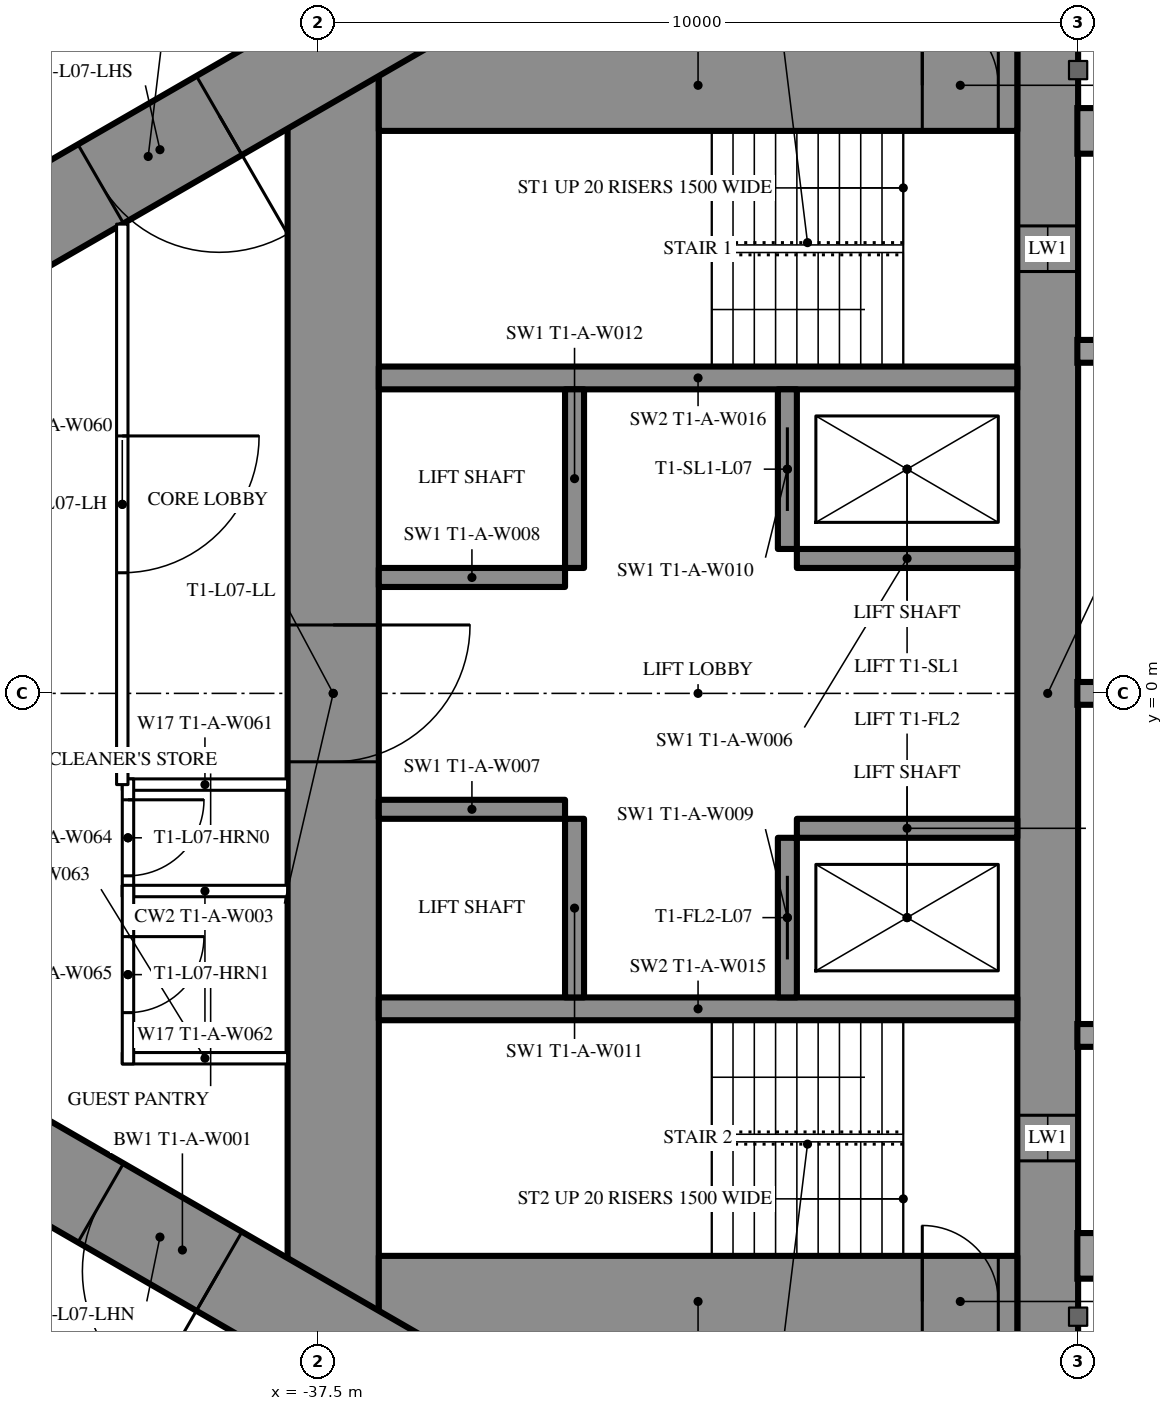
"""IFC4 building model, lengths in metres.
Left out: names, types, materials, properties, quantities, classifications, styles, units other than length and angle.
Written with IfcOpenShell. Run it as: python <this file> out.ifc"""

import sys

from ifc_helpers import new_model, si_unit, direction, frame, frame_2d, origin, place, context, subcontext, project, spatial, rectangle, extrude, element, fill, save


model = new_model("IFC4")
c1 = context("Model", 3, precision=1e-05, world=origin(), true_north=direction((0.0, 1.0)))
c2 = subcontext(c1, "Body", "Model", "MODEL_VIEW")
j1 = project(units=[si_unit("LENGTHUNIT", "METRE"), si_unit("PLANEANGLEUNIT", "RADIAN")], contexts=[c1])
p1 = place(None, origin())
s1 = spatial("IfcSite", under=j1, at=p1, CompositionType="ELEMENT")
p2 = place(p1, origin())
s2 = spatial("IfcBuilding", under=s1, at=p2, CompositionType="ELEMENT")
p3 = place(p2, frame((0.0, 0.0, 32.0)))
s3 = spatial("IfcBuildingStorey", under=s2, at=p3, CompositionType="ELEMENT", Elevation=32.0)
p4 = place(p3, frame((-27.9, 8.6, 0.0), z_axis=(0.0, 0.0, 1.0), x_axis=(0.0, -1.0, 0.0)))
e1 = element("IfcWall", 1, at=p4, inside=s3, PredefinedType="SHEAR", context=c2, shape_type="SweptSolid", body=[
    extrude(rectangle(XDim=17.2, YDim=0.8, at=frame_2d((8.6, 0.0))), origin(), (0.0, 0.0, 1.0), 3.5),
])
p5 = place(p4, frame((2.45, 0.0, 0.6)))
e2 = element("IfcOpeningElement", 2, at=p5, cuts=e1, PredefinedType="OPENING", context=c2, shape_type="SweptSolid", body=[
    extrude(rectangle(XDim=0.6, YDim=2.1, at=frame_2d((0.3, 1.05))), frame((0.0, 0.41, 0.0), z_axis=(0.0, -1.0, 0.0), x_axis=(1.0, 0.0, 0.0)), (0.0, 0.0, 1.0), 0.82),
])
p6 = place(p4, frame((14.15, 0.0, 0.6)))
e3 = element("IfcOpeningElement", 3, at=p6, cuts=e1, PredefinedType="OPENING", context=c2, shape_type="SweptSolid", body=[
    extrude(rectangle(XDim=0.6, YDim=2.1, at=frame_2d((0.3, 1.05))), frame((0.0, 0.41, 0.0), z_axis=(0.0, -1.0, 0.0), x_axis=(1.0, 0.0, 0.0)), (0.0, 0.0, 1.0), 0.82),
])
p7 = place(p3, frame((-37.3, 8.6, 0.0), z_axis=(0.0, 0.0, 1.0), x_axis=(0.0, -1.0, 0.0)))
e4 = element("IfcWall", 4, at=p7, inside=s3, PredefinedType="SHEAR", context=c2, shape_type="SweptSolid", body=[
    extrude(rectangle(XDim=17.2, YDim=1.2, at=frame_2d((8.6, 0.0))), origin(), (0.0, 0.0, 1.0), 3.5),
])
p8 = place(p7, frame((7.7, 0.0, 0.0)))
e5 = element("IfcOpeningElement", 5, at=p8, cuts=e4, PredefinedType="OPENING", context=c2, shape_type="SweptSolid", body=[
    extrude(rectangle(XDim=1.8, YDim=2.2, at=frame_2d((0.9, 1.1))), frame((0.0, 0.61, 0.0), z_axis=(0.0, -1.0, 0.0), x_axis=(1.0, 0.0, 0.0)), (0.0, 0.0, 1.0), 1.22),
])
p9 = place(p3, frame((-28.3, 8.0, 0.0), z_axis=(0.0, 0.0, 1.0), x_axis=(-1.0, 0.0, 0.0)))
e6 = element("IfcWall", 6, at=p9, inside=s3, PredefinedType="SHEAR", context=c2, shape_type="SweptSolid", body=[
    extrude(rectangle(XDim=8.4, YDim=1.2, at=frame_2d((4.2, 0.0))), origin(), (0.0, 0.0, 1.0), 3.5),
])
p10 = place(p9, frame((0.25, 0.0, 0.0)))
e7 = element("IfcOpeningElement", 7, at=p10, cuts=e6, PredefinedType="OPENING", context=c2, shape_type="SweptSolid", body=[
    extrude(rectangle(XDim=1.0, YDim=2.2, at=frame_2d((0.5, 1.1))), frame((0.0, 0.61, 0.0), z_axis=(0.0, -1.0, 0.0), x_axis=(1.0, 0.0, 0.0)), (0.0, 0.0, 1.0), 1.22),
])
p11 = place(p3, frame((-28.3, -8.0, 0.0), z_axis=(0.0, 0.0, 1.0), x_axis=(-1.0, 0.0, 0.0)))
e8 = element("IfcWall", 8, at=p11, inside=s3, PredefinedType="SHEAR", context=c2, shape_type="SweptSolid", body=[
    extrude(rectangle(XDim=8.4, YDim=1.2, at=frame_2d((4.2, 0.0))), origin(), (0.0, 0.0, 1.0), 3.5),
])
p12 = place(p11, frame((0.25, 0.0, 0.0)))
e9 = element("IfcOpeningElement", 9, at=p12, cuts=e8, PredefinedType="OPENING", context=c2, shape_type="SweptSolid", body=[
    extrude(rectangle(XDim=1.0, YDim=2.2, at=frame_2d((0.5, 1.1))), frame((0.0, 0.61, 0.0), z_axis=(0.0, -1.0, 0.0), x_axis=(1.0, 0.0, 0.0)), (0.0, 0.0, 1.0), 1.22),
])
for number, where, z_axis, x_axis in (
    (10, (-28.3, 4.15, 0.0), (0.0, 0.0, 1.0), (-1.0, 0.0, 0.0)),
    (11, (-28.3, -4.15, 0.0), (0.0, 0.0, 1.0), (-1.0, 0.0, 0.0)),
):
    element("IfcWall", number, at=place(p3, frame(where, z_axis=z_axis, x_axis=x_axis)), inside=s3, PredefinedType="SHEAR", context=c2, shape_type="SweptSolid", body=[
        extrude(rectangle(XDim=8.4, YDim=0.3, at=frame_2d((4.2, 0.0))), origin(), (0.0, 0.0, 1.0), 3.5),
    ])
p13 = place(p3, frame((-31.325, 4.0, 0.0), z_axis=(0.0, 0.0, 1.0), x_axis=(0.0, -1.0, 0.0)))
e12 = element("IfcWall", 12, at=p13, inside=s3, PredefinedType="SHEAR", context=c2, shape_type="SweptSolid", body=[
    extrude(rectangle(XDim=2.1, YDim=0.25, at=frame_2d((1.05, 0.0))), origin(), (0.0, 0.0, 1.0), 3.5),
])
p14 = place(p13, frame((0.5, 0.0, 0.0)))
e13 = element("IfcOpeningElement", 13, at=p14, cuts=e12, PredefinedType="OPENING", context=c2, shape_type="SweptSolid", body=[
    extrude(rectangle(XDim=1.1, YDim=2.2, at=frame_2d((0.55, 1.1))), frame((0.0, 0.135, 0.0), z_axis=(0.0, -1.0, 0.0), x_axis=(1.0, 0.0, 0.0)), (0.0, 0.0, 1.0), 0.27),
])
p15 = place(p3, frame((-34.125, 4.0, 0.0), z_axis=(0.0, 0.0, 1.0), x_axis=(0.0, -1.0, 0.0)))
e14 = element("IfcWall", 14, at=p15, inside=s3, PredefinedType="SHEAR", context=c2, shape_type="SweptSolid", body=[
    extrude(rectangle(XDim=2.35, YDim=0.25, at=frame_2d((1.175, 0.0))), origin(), (0.0, 0.0, 1.0), 3.5),
])
p16 = place(p3, frame((-28.3, 1.775, 0.0), z_axis=(0.0, 0.0, 1.0), x_axis=(-1.0, 0.0, 0.0)))
e15 = element("IfcWall", 15, at=p16, inside=s3, PredefinedType="SHEAR", context=c2, shape_type="SweptSolid", body=[
    extrude(rectangle(XDim=2.9, YDim=0.25, at=frame_2d((1.45, 0.0))), origin(), (0.0, 0.0, 1.0), 3.5),
])
p17 = place(p3, frame((-34.25, 1.525, 0.0), z_axis=(0.0, 0.0, 1.0), x_axis=(-1.0, 0.0, 0.0)))
e16 = element("IfcWall", 16, at=p17, inside=s3, PredefinedType="SHEAR", context=c2, shape_type="SweptSolid", body=[
    extrude(rectangle(XDim=2.45, YDim=0.25, at=frame_2d((1.225, 0.0))), origin(), (0.0, 0.0, 1.0), 3.5),
])
p18 = place(p3, frame((-31.325, -1.9, 0.0), z_axis=(0.0, 0.0, 1.0), x_axis=(0.0, -1.0, 0.0)))
e17 = element("IfcWall", 17, at=p18, inside=s3, PredefinedType="SHEAR", context=c2, shape_type="SweptSolid", body=[
    extrude(rectangle(XDim=2.1, YDim=0.25, at=frame_2d((1.05, 0.0))), origin(), (0.0, 0.0, 1.0), 3.5),
])
p19 = place(p18, frame((0.5, 0.0, 0.0)))
e18 = element("IfcOpeningElement", 18, at=p19, cuts=e17, PredefinedType="OPENING", context=c2, shape_type="SweptSolid", body=[
    extrude(rectangle(XDim=1.1, YDim=2.2, at=frame_2d((0.55, 1.1))), frame((0.0, 0.135, 0.0), z_axis=(0.0, -1.0, 0.0), x_axis=(1.0, 0.0, 0.0)), (0.0, 0.0, 1.0), 0.27),
])
p20 = place(p3, frame((-34.125, -1.65, 0.0), z_axis=(0.0, 0.0, 1.0), x_axis=(0.0, -1.0, 0.0)))
e19 = element("IfcWall", 19, at=p20, inside=s3, PredefinedType="SHEAR", context=c2, shape_type="SweptSolid", body=[
    extrude(rectangle(XDim=2.35, YDim=0.25, at=frame_2d((1.175, 0.0))), origin(), (0.0, 0.0, 1.0), 3.5),
])
p21 = place(p3, frame((-28.3, -1.775, 0.0), z_axis=(0.0, 0.0, 1.0), x_axis=(-1.0, 0.0, 0.0)))
e20 = element("IfcWall", 20, at=p21, inside=s3, PredefinedType="SHEAR", context=c2, shape_type="SweptSolid", body=[
    extrude(rectangle(XDim=2.9, YDim=0.25, at=frame_2d((1.45, 0.0))), origin(), (0.0, 0.0, 1.0), 3.5),
])
p22 = place(p3, frame((-34.25, -1.525, 0.0), z_axis=(0.0, 0.0, 1.0), x_axis=(-1.0, 0.0, 0.0)))
e21 = element("IfcWall", 21, at=p22, inside=s3, PredefinedType="SHEAR", context=c2, shape_type="SweptSolid", body=[
    extrude(rectangle(XDim=2.45, YDim=0.25, at=frame_2d((1.225, 0.0))), origin(), (0.0, 0.0, 1.0), 3.5),
])
p23 = place(p3, frame((-27.2, 14.3, 0.0), z_axis=(0.0, 0.0, 1.0), x_axis=(-0.866026593062, -0.499997940104, 0.0)))
e22 = element("IfcWall", 22, at=p23, inside=s3, PredefinedType="SHEAR", context=c2, shape_type="SweptSolid", body=[
    extrude(rectangle(XDim=28.946, YDim=1.2, at=frame_2d((14.473, 0.0))), origin(), (0.0, 0.0, 1.0), 3.5),
])
p24 = place(p23, frame((4.6, 0.0, 0.0)))
e23 = element("IfcOpeningElement", 23, at=p24, cuts=e22, PredefinedType="OPENING", context=c2, shape_type="SweptSolid", body=[
    extrude(rectangle(XDim=1.0, YDim=2.2, at=frame_2d((0.5, 1.1))), frame((0.0, 0.61, 0.0), z_axis=(0.0, -1.0, 0.0), x_axis=(1.0, 0.0, 0.0)), (0.0, 0.0, 1.0), 1.22),
])
p25 = place(p23, frame((13.395, 0.0, 0.0)))
e24 = element("IfcOpeningElement", 24, at=p25, cuts=e22, PredefinedType="OPENING", context=c2, shape_type="SweptSolid", body=[
    extrude(rectangle(XDim=1.8, YDim=2.2, at=frame_2d((0.9, 1.1))), frame((0.0, 0.61, 0.0), z_axis=(0.0, -1.0, 0.0), x_axis=(1.0, 0.0, 0.0)), (0.0, 0.0, 1.0), 1.22),
])
p26 = place(p3, frame((-27.2, -14.3, 0.0), z_axis=(0.0, 0.0, 1.0), x_axis=(-0.866024021859, 0.500002393557, 0.0)))
e25 = element("IfcWall", 25, at=p26, inside=s3, PredefinedType="SHEAR", context=c2, shape_type="SweptSolid", body=[
    extrude(rectangle(XDim=27.907, YDim=1.2, at=frame_2d((13.954, 0.0))), origin(), (0.0, 0.0, 1.0), 3.5),
])
p27 = place(p26, frame((4.6, 0.0, 0.0)))
e26 = element("IfcOpeningElement", 26, at=p27, cuts=e25, PredefinedType="OPENING", context=c2, shape_type="SweptSolid", body=[
    extrude(rectangle(XDim=1.0, YDim=2.2, at=frame_2d((0.5, 1.1))), frame((0.0, 0.61, 0.0), z_axis=(0.0, -1.0, 0.0), x_axis=(1.0, 0.0, 0.0)), (0.0, 0.0, 1.0), 1.22),
])
p28 = place(p26, frame((13.395, 0.0, 0.0)))
e27 = element("IfcOpeningElement", 27, at=p28, cuts=e25, PredefinedType="OPENING", context=c2, shape_type="SweptSolid", body=[
    extrude(rectangle(XDim=1.8, YDim=2.2, at=frame_2d((0.9, 1.1))), frame((0.0, 0.61, 0.0), z_axis=(0.0, -1.0, 0.0), x_axis=(1.0, 0.0, 0.0)), (0.0, 0.0, 1.0), 1.22),
])
p29 = place(p3, frame((-37.7, 10.894, 0.0), z_axis=(0.0, 0.0, 1.0), x_axis=(-0.866027905338, -0.499995667157, 0.0)))
e28 = element("IfcWall", 28, at=p29, inside=s3, PredefinedType="PARTITIONING", context=c2, shape_type="SweptSolid", body=[
    extrude(rectangle(XDim=21.787, YDim=0.2, at=frame_2d((10.894, 0.0))), origin(), (0.0, 0.0, 1.0), 3.25),
])
p30 = place(p29, frame((16.008, 0.0, 0.0)))
e29 = element("IfcOpeningElement", 29, at=p30, cuts=e28, PredefinedType="OPENING", context=c2, shape_type="SweptSolid", body=[
    extrude(rectangle(XDim=0.95, YDim=2.2, at=frame_2d((0.475, 1.1))), frame((0.0, 0.11, 0.0), z_axis=(0.0, -1.0, 0.0), x_axis=(1.0, 0.0, 0.0)), (0.0, 0.0, 1.0), 0.22),
])
p31 = place(p29, frame((20.058, 0.0, 0.0)))
e30 = element("IfcOpeningElement", 30, at=p31, cuts=e28, PredefinedType="OPENING", context=c2, shape_type="SweptSolid", body=[
    extrude(rectangle(XDim=0.95, YDim=2.2, at=frame_2d((0.475, 1.1))), frame((0.0, 0.11, 0.0), z_axis=(0.0, -1.0, 0.0), x_axis=(1.0, 0.0, 0.0)), (0.0, 0.0, 1.0), 0.22),
])
p32 = place(p29, frame((2.95, 0.0, 0.0)))
e31 = element("IfcOpeningElement", 31, at=p32, cuts=e28, PredefinedType="OPENING", context=c2, shape_type="SweptSolid", body=[
    extrude(rectangle(XDim=0.95, YDim=2.2, at=frame_2d((0.475, 1.1))), frame((0.0, 0.11, 0.0), z_axis=(0.0, -1.0, 0.0), x_axis=(1.0, 0.0, 0.0)), (0.0, 0.0, 1.0), 0.22),
])
p33 = place(p3, frame((-36.92, -11.344, 0.0), z_axis=(0.0, 0.0, 1.0), x_axis=(-0.866028313256, 0.499994960614, 0.0)))
e32 = element("IfcWall", 32, at=p33, inside=s3, PredefinedType="PARTITIONING", context=c2, shape_type="SweptSolid", body=[
    extrude(rectangle(XDim=22.568, YDim=0.2, at=frame_2d((11.284, 0.0))), origin(), (0.0, 0.0, 1.0), 3.25),
])
p34 = place(p33, frame((12.68, 0.0, 0.0)))
e33 = element("IfcOpeningElement", 33, at=p34, cuts=e32, PredefinedType="OPENING", context=c2, shape_type="SweptSolid", body=[
    extrude(rectangle(XDim=0.95, YDim=2.2, at=frame_2d((0.475, 1.1))), frame((0.0, 0.11, 0.0), z_axis=(0.0, -1.0, 0.0), x_axis=(1.0, 0.0, 0.0)), (0.0, 0.0, 1.0), 0.22),
])
p35 = place(p33, frame((3.35, 0.0, 0.0)))
e34 = element("IfcOpeningElement", 34, at=p35, cuts=e32, PredefinedType="OPENING", context=c2, shape_type="SweptSolid", body=[
    extrude(rectangle(XDim=1.0, YDim=2.2, at=frame_2d((0.5, 1.1))), frame((0.0, 0.11, 0.0), z_axis=(0.0, -1.0, 0.0), x_axis=(1.0, 0.0, 0.0)), (0.0, 0.0, 1.0), 0.22),
])
for number, where, z_axis, x_axis in (
    (35, (-37.9, -1.2, 0.0), (0.0, 0.0, 1.0), (-1.0, 0.0, 0.0)),
    (36, (-37.9, -2.6, 0.0), (0.0, 0.0, 1.0), (-1.0, 0.0, 0.0)),
    (37, (-37.9, -4.8, 0.0), (0.0, 0.0, 1.0), (-1.0, 0.0, 0.0)),
):
    element("IfcWall", number, at=place(p3, frame(where, z_axis=z_axis, x_axis=x_axis)), inside=s3, PredefinedType="PARTITIONING", context=c2, shape_type="SweptSolid", body=[
        extrude(rectangle(XDim=2.175, YDim=0.15, at=frame_2d((1.087, 0.0))), origin(), (0.0, 0.0, 1.0), 3.25),
    ])
p36 = place(p3, frame((-40.0, -1.125, 0.0), z_axis=(0.0, 0.0, 1.0), x_axis=(0.0, -1.0, 0.0)))
e38 = element("IfcWall", 38, at=p36, inside=s3, PredefinedType="PARTITIONING", context=c2, shape_type="SweptSolid", body=[
    extrude(rectangle(XDim=1.55, YDim=0.15, at=frame_2d((0.775, 0.0))), origin(), (0.0, 0.0, 1.0), 3.25),
])
p37 = place(p36, frame((0.275, 0.0, 0.0)))
e39 = element("IfcOpeningElement", 39, at=p37, cuts=e38, PredefinedType="OPENING", context=c2, shape_type="SweptSolid", body=[
    extrude(rectangle(XDim=1.0, YDim=2.2, at=frame_2d((0.5, 1.1))), frame((0.0, 0.085, 0.0), z_axis=(0.0, -1.0, 0.0), x_axis=(1.0, 0.0, 0.0)), (0.0, 0.0, 1.0), 0.17),
])
p38 = place(p3, frame((-40.0, -2.525, 0.0), z_axis=(0.0, 0.0, 1.0), x_axis=(0.0, -1.0, 0.0)))
e40 = element("IfcWall", 40, at=p38, inside=s3, PredefinedType="PARTITIONING", context=c2, shape_type="SweptSolid", body=[
    extrude(rectangle(XDim=2.35, YDim=0.15, at=frame_2d((1.175, 0.0))), origin(), (0.0, 0.0, 1.0), 3.25),
])
p39 = place(p38, frame((0.675, 0.0, 0.0)))
e41 = element("IfcOpeningElement", 41, at=p39, cuts=e40, PredefinedType="OPENING", context=c2, shape_type="SweptSolid", body=[
    extrude(rectangle(XDim=1.0, YDim=2.2, at=frame_2d((0.5, 1.1))), frame((0.0, 0.085, 0.0), z_axis=(0.0, -1.0, 0.0), x_axis=(1.0, 0.0, 0.0)), (0.0, 0.0, 1.0), 0.17),
])
p40 = place(p3, frame((-40.075, 6.174, 0.0), z_axis=(0.0, 0.0, 1.0), x_axis=(0.0, -1.0, 0.0)))
e42 = element("IfcWall", 42, at=p40, inside=s3, PredefinedType="PARTITIONING", context=c2, shape_type="SweptSolid", body=[
    extrude(rectangle(XDim=7.374, YDim=0.15, at=frame_2d((3.687, 0.0))), origin(), (0.0, 0.0, 1.0), 3.25),
])
p41 = place(p40, frame((2.787, 0.0, 0.0)))
e43 = element("IfcOpeningElement", 43, at=p41, cuts=e42, PredefinedType="OPENING", context=c2, shape_type="SweptSolid", body=[
    extrude(rectangle(XDim=1.8, YDim=2.2, at=frame_2d((0.9, 1.1))), frame((0.0, 0.085, 0.0), z_axis=(0.0, -1.0, 0.0), x_axis=(1.0, 0.0, 0.0)), (0.0, 0.0, 1.0), 0.17),
])
p42 = place(p37, origin())
e44 = element("IfcDoor", 44, at=p42, inside=s3, OperationType="SINGLE_SWING_LEFT", PredefinedType="DOOR", context=c2, shape_type="SweptSolid", body=[
    extrude(rectangle(XDim=1.0, YDim=2.2, at=frame_2d((0.5, 1.1))), frame((0.0, 0.025, 0.0), z_axis=(0.0, -1.0, 0.0), x_axis=(1.0, 0.0, 0.0)), (0.0, 0.0, 1.0), 0.05),
])
fill(e39, e44)
p43 = place(p39, origin())
e45 = element("IfcDoor", 45, at=p43, inside=s3, OperationType="SINGLE_SWING_LEFT", PredefinedType="DOOR", context=c2, shape_type="SweptSolid", body=[
    extrude(rectangle(XDim=1.0, YDim=2.2, at=frame_2d((0.5, 1.1))), frame((0.0, 0.025, 0.0), z_axis=(0.0, -1.0, 0.0), x_axis=(1.0, 0.0, 0.0)), (0.0, 0.0, 1.0), 0.05),
])
fill(e41, e45)
p44 = place(p41, origin())
e46 = element("IfcDoor", 46, at=p44, inside=s3, OperationType="DOUBLE_DOOR_SINGLE_SWING", PredefinedType="DOOR", context=c2, shape_type="SweptSolid", body=[
    extrude(rectangle(XDim=1.8, YDim=2.2, at=frame_2d((0.9, 1.1))), frame((0.0, 0.025, 0.0), z_axis=(0.0, -1.0, 0.0), x_axis=(1.0, 0.0, 0.0)), (0.0, 0.0, 1.0), 0.05),
])
fill(e43, e46)
p45 = place(p25, origin())
e47 = element("IfcDoor", 47, at=p45, inside=s3, OperationType="DOUBLE_DOOR_SINGLE_SWING", PredefinedType="DOOR", context=c2, shape_type="SweptSolid", body=[
    extrude(rectangle(XDim=1.8, YDim=2.2, at=frame_2d((0.9, 1.1))), frame((0.0, 0.025, 0.0), z_axis=(0.0, -1.0, 0.0), x_axis=(1.0, 0.0, 0.0)), (0.0, 0.0, 1.0), 0.05),
])
fill(e24, e47)
p46 = place(p28, origin())
e48 = element("IfcDoor", 48, at=p46, inside=s3, OperationType="DOUBLE_DOOR_SINGLE_SWING", PredefinedType="DOOR", context=c2, shape_type="SweptSolid", body=[
    extrude(rectangle(XDim=1.8, YDim=2.2, at=frame_2d((0.9, 1.1))), frame((0.0, 0.025, 0.0), z_axis=(0.0, -1.0, 0.0), x_axis=(1.0, 0.0, 0.0)), (0.0, 0.0, 1.0), 0.05),
])
fill(e27, e48)
p47 = place(p8, origin())
e49 = element("IfcDoor", 49, at=p47, inside=s3, OperationType="DOUBLE_DOOR_SINGLE_SWING", PredefinedType="DOOR", context=c2, shape_type="SweptSolid", body=[
    extrude(rectangle(XDim=1.8, YDim=2.2, at=frame_2d((0.9, 1.1))), frame((0.0, 0.025, 0.0), z_axis=(0.0, -1.0, 0.0), x_axis=(1.0, 0.0, 0.0)), (0.0, 0.0, 1.0), 0.05),
])
fill(e5, e49)
p48 = place(p10, origin())
e50 = element("IfcDoor", 50, at=p48, inside=s3, OperationType="SINGLE_SWING_RIGHT", PredefinedType="DOOR", context=c2, shape_type="SweptSolid", body=[
    extrude(rectangle(XDim=1.0, YDim=2.2, at=frame_2d((0.5, 1.1))), frame((0.0, 0.025, 0.0), z_axis=(0.0, -1.0, 0.0), x_axis=(1.0, 0.0, 0.0)), (0.0, 0.0, 1.0), 0.05),
])
fill(e7, e50)
p49 = place(p12, origin())
e51 = element("IfcDoor", 51, at=p49, inside=s3, OperationType="SINGLE_SWING_RIGHT", PredefinedType="DOOR", context=c2, shape_type="SweptSolid", body=[
    extrude(rectangle(XDim=1.0, YDim=2.2, at=frame_2d((0.5, 1.1))), frame((0.0, 0.025, 0.0), z_axis=(0.0, -1.0, 0.0), x_axis=(1.0, 0.0, 0.0)), (0.0, 0.0, 1.0), 0.05),
])
fill(e9, e51)
p50 = place(p14, origin())
e52 = element("IfcDoor", 52, at=p50, inside=s3, OperationType="SLIDING_TO_LEFT", PredefinedType="USERDEFINED", context=c2, shape_type="SweptSolid", body=[
    extrude(rectangle(XDim=1.1, YDim=2.2, at=frame_2d((0.55, 1.1))), frame((0.0, 0.025, 0.0), z_axis=(0.0, -1.0, 0.0), x_axis=(1.0, 0.0, 0.0)), (0.0, 0.0, 1.0), 0.05),
])
fill(e13, e52)
p51 = place(p19, origin())
e53 = element("IfcDoor", 53, at=p51, inside=s3, OperationType="SLIDING_TO_LEFT", PredefinedType="USERDEFINED", context=c2, shape_type="SweptSolid", body=[
    extrude(rectangle(XDim=1.1, YDim=2.2, at=frame_2d((0.55, 1.1))), frame((0.0, 0.025, 0.0), z_axis=(0.0, -1.0, 0.0), x_axis=(1.0, 0.0, 0.0)), (0.0, 0.0, 1.0), 0.05),
])
fill(e18, e53)
p52 = place(p5, origin())
e54 = element("IfcWindow", 54, at=p52, inside=s3, PartitioningType="SINGLE_PANEL", PredefinedType="WINDOW", context=c2, shape_type="SweptSolid", body=[
    extrude(rectangle(XDim=0.6, YDim=2.1, at=frame_2d((0.3, 1.05))), frame((0.0, 0.03, 0.0), z_axis=(0.0, -1.0, 0.0), x_axis=(1.0, 0.0, 0.0)), (0.0, 0.0, 1.0), 0.06),
])
fill(e2, e54)
p53 = place(p6, origin())
e55 = element("IfcWindow", 55, at=p53, inside=s3, PartitioningType="SINGLE_PANEL", PredefinedType="WINDOW", context=c2, shape_type="SweptSolid", body=[
    extrude(rectangle(XDim=0.6, YDim=2.1, at=frame_2d((0.3, 1.05))), frame((0.0, 0.03, 0.0), z_axis=(0.0, -1.0, 0.0), x_axis=(1.0, 0.0, 0.0)), (0.0, 0.0, 1.0), 0.06),
])
fill(e3, e55)
save(model, sys.argv[1])
